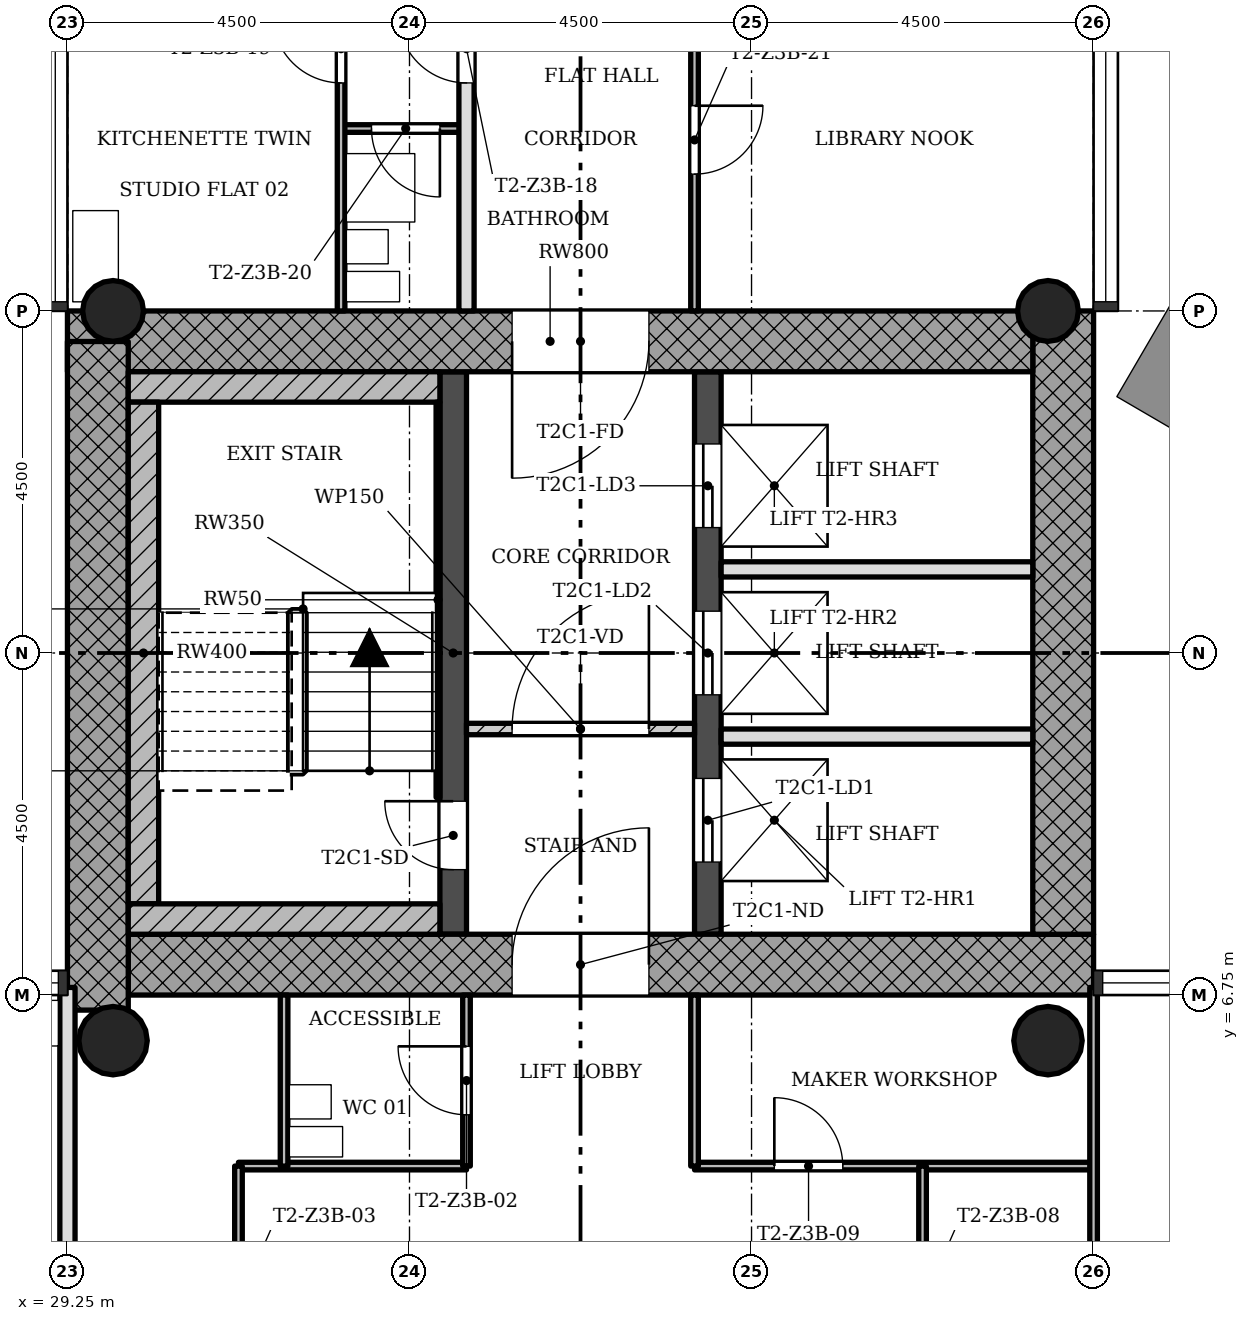
"""IFC4 building model, lengths in metres.
Left out: names, types, materials, properties, quantities, classifications, styles, units other than length and angle.
Written with IfcOpenShell. Run it as: python <this file> out.ifc"""

import sys

from ifc_helpers import new_model, si_unit, direction, frame, frame_2d, origin, origin_2d, place, context, subcontext, project, spatial, rectangle, hollow_circle, extrude, element, fill, save


model = new_model("IFC4")
c1 = context("Model", 3, precision=1e-05, world=origin(), true_north=direction((0.0, 1.0)))
c2 = subcontext(c1, "Body", "Model", "MODEL_VIEW")
j1 = project(units=[si_unit("LENGTHUNIT", "METRE"), si_unit("PLANEANGLEUNIT", "RADIAN")], contexts=[c1])
p1 = place(None, origin())
s1 = spatial("IfcSite", under=j1, at=p1, CompositionType="ELEMENT")
p2 = place(p1, origin())
s2 = spatial("IfcBuilding", under=s1, at=p2, CompositionType="ELEMENT")
p3 = place(p2, frame((0.0, 0.0, 143.9)))
s3 = spatial("IfcBuildingStorey", under=s2, at=p3, CompositionType="ELEMENT", Elevation=143.9)
p4 = place(p3, frame((30.05, 7.15, 0.0), z_axis=(0.0, 0.0, 1.0), x_axis=(1.0, 0.0, 0.0)))
e1 = element("IfcWall", 1, at=p4, inside=s3, PredefinedType="SHEAR", context=c2, shape_type="SweptSolid", body=[
    extrude(rectangle(XDim=12.7, YDim=0.8, at=frame_2d((6.35, 0.0))), origin(), (0.0, 0.0, 1.0), 3.4),
])
p5 = place(p4, frame((5.05, 0.0, 0.0)))
e2 = element("IfcOpeningElement", 2, at=p5, cuts=e1, PredefinedType="OPENING", context=c2, shape_type="SweptSolid", body=[
    extrude(rectangle(XDim=1.8, YDim=2.1, at=frame_2d((0.9, 1.05))), frame((0.0, 0.41, 0.0), z_axis=(0.0, -1.0, 0.0), x_axis=(1.0, 0.0, 0.0)), (0.0, 0.0, 1.0), 0.82),
])
p6 = place(p3, frame((42.35, 7.55, 0.0), z_axis=(0.0, 0.0, 1.0), x_axis=(0.0, 1.0, 0.0)))
e3 = element("IfcWall", 3, at=p6, inside=s3, PredefinedType="SHEAR", context=c2, shape_type="SweptSolid", body=[
    extrude(rectangle(XDim=8.2, YDim=0.8, at=frame_2d((4.1, 0.0))), origin(), (0.0, 0.0, 1.0), 3.4),
])
p7 = place(p3, frame((41.95, 15.35, 0.0), z_axis=(0.0, 0.0, 1.0), x_axis=(-1.0, 0.0, 0.0)))
e4 = element("IfcWall", 4, at=p7, inside=s3, PredefinedType="SHEAR", context=c2, shape_type="SweptSolid", body=[
    extrude(rectangle(XDim=12.7, YDim=0.8, at=frame_2d((6.35, 0.0))), origin(), (0.0, 0.0, 1.0), 3.4),
])
p8 = place(p7, frame((5.05, 0.0, 0.0)))
e5 = element("IfcOpeningElement", 5, at=p8, cuts=e4, PredefinedType="OPENING", context=c2, shape_type="SweptSolid", body=[
    extrude(rectangle(XDim=1.8, YDim=2.1, at=frame_2d((0.9, 1.05))), frame((0.0, 0.41, 0.0), z_axis=(0.0, -1.0, 0.0), x_axis=(1.0, 0.0, 0.0)), (0.0, 0.0, 1.0), 0.82),
])
p9 = place(p3, frame((29.65, 15.348, 0.0), z_axis=(0.0, 0.0, 1.0), x_axis=(0.0, -1.0, 0.0)))
e6 = element("IfcWall", 6, at=p9, inside=s3, PredefinedType="SHEAR", context=c2, shape_type="SweptSolid", body=[
    extrude(rectangle(XDim=8.796, YDim=0.8, at=frame_2d((4.398, 0.0))), origin(), (0.0, 0.0, 1.0), 3.4),
])
p10 = place(p3, frame((34.325, 7.55, 0.0), z_axis=(0.0, 0.0, 1.0), x_axis=(0.0, 1.0, 0.0)))
e7 = element("IfcWall", 7, at=p10, inside=s3, PredefinedType="SHEAR", context=c2, shape_type="SweptSolid", body=[
    extrude(rectangle(XDim=7.4, YDim=0.35, at=frame_2d((3.7, 0.0))), origin(), (0.0, 0.0, 1.0), 3.4),
])
p11 = place(p10, frame((0.85, 0.0, 0.0)))
e8 = element("IfcOpeningElement", 8, at=p11, cuts=e7, PredefinedType="OPENING", context=c2, shape_type="SweptSolid", body=[
    extrude(rectangle(XDim=0.9, YDim=2.1, at=frame_2d((0.45, 1.05))), frame((0.0, 0.185, 0.0), z_axis=(0.0, -1.0, 0.0), x_axis=(1.0, 0.0, 0.0)), (0.0, 0.0, 1.0), 0.37),
])
p12 = place(p3, frame((37.675, 7.55, 0.0), z_axis=(0.0, 0.0, 1.0), x_axis=(0.0, 1.0, 0.0)))
e9 = element("IfcWall", 9, at=p12, inside=s3, PredefinedType="SHEAR", context=c2, shape_type="SweptSolid", body=[
    extrude(rectangle(XDim=7.4, YDim=0.35, at=frame_2d((3.7, 0.0))), origin(), (0.0, 0.0, 1.0), 3.4),
])
p13 = place(p12, frame((0.95, 0.0, 0.0)))
e10 = element("IfcOpeningElement", 10, at=p13, cuts=e9, PredefinedType="OPENING", context=c2, shape_type="SweptSolid", body=[
    extrude(rectangle(XDim=1.1, YDim=2.1, at=frame_2d((0.55, 1.05))), frame((0.0, 0.185, 0.0), z_axis=(0.0, -1.0, 0.0), x_axis=(1.0, 0.0, 0.0)), (0.0, 0.0, 1.0), 0.37),
])
p14 = place(p12, frame((3.15, 0.0, 0.0)))
e11 = element("IfcOpeningElement", 11, at=p14, cuts=e9, PredefinedType="OPENING", context=c2, shape_type="SweptSolid", body=[
    extrude(rectangle(XDim=1.1, YDim=2.1, at=frame_2d((0.55, 1.05))), frame((0.0, 0.185, 0.0), z_axis=(0.0, -1.0, 0.0), x_axis=(1.0, 0.0, 0.0)), (0.0, 0.0, 1.0), 0.37),
])
p15 = place(p12, frame((5.35, 0.0, 0.0)))
e12 = element("IfcOpeningElement", 12, at=p15, cuts=e9, PredefinedType="OPENING", context=c2, shape_type="SweptSolid", body=[
    extrude(rectangle(XDim=1.1, YDim=2.1, at=frame_2d((0.55, 1.05))), frame((0.0, 0.185, 0.0), z_axis=(0.0, -1.0, 0.0), x_axis=(1.0, 0.0, 0.0)), (0.0, 0.0, 1.0), 0.37),
])
for number, where, z_axis, x_axis in (
    (13, (42.15, 15.75, 0.0), (0.0, 0.0, 1.0), (1.0, 0.0, 0.0)),
    (14, (29.85, 15.75, 0.0), (0.0, 0.0, 1.0), (1.0, 0.0, 0.0)),
):
    element("IfcColumn", number, at=place(p3, frame(where, z_axis=z_axis, x_axis=x_axis)), inside=s3, PredefinedType="COLUMN", context=c2, shape_type="SweptSolid", body=[
        extrude(hollow_circle(Radius=0.4, WallThickness=0.028, at=origin_2d()), origin(), (0.0, 0.0, 1.0), 3.4),
    ])
for number, where, z_axis, x_axis in (
    (15, (42.15, 6.15, 0.0), (0.0, 0.0, 1.0), (1.0, 0.0, 0.0)),
    (16, (29.85, 6.15, 0.0), (0.0, 0.0, 1.0), (1.0, 0.0, 0.0)),
):
    element("IfcColumn", number, at=place(p3, frame(where, z_axis=z_axis, x_axis=x_axis)), inside=s3, PredefinedType="COLUMN", context=c2, shape_type="SweptSolid", body=[
        extrude(hollow_circle(Radius=0.45, WallThickness=0.032, at=origin_2d()), origin(), (0.0, 0.0, 1.0), 3.4),
    ])
p16 = place(p3, frame((37.5, 10.25, 0.0), z_axis=(0.0, 0.0, 1.0), x_axis=(-1.0, 0.0, 0.0)))
e17 = element("IfcWall", 17, at=p16, inside=s3, PredefinedType="PARTITIONING", context=c2, shape_type="SweptSolid", body=[
    extrude(rectangle(XDim=3.0, YDim=0.15, at=frame_2d((1.5, 0.0))), origin(), (0.0, 0.0, 1.0), 3.0),
])
p17 = place(p16, frame((0.6, 0.0, 0.0)))
e18 = element("IfcOpeningElement", 18, at=p17, cuts=e17, PredefinedType="OPENING", context=c2, shape_type="SweptSolid", body=[
    extrude(rectangle(XDim=1.8, YDim=2.1, at=frame_2d((0.9, 1.05))), frame((0.0, 0.085, 0.0), z_axis=(0.0, -1.0, 0.0), x_axis=(1.0, 0.0, 0.0)), (0.0, 0.0, 1.0), 0.17),
])
for number, where, z_axis, x_axis in (
    (19, (41.95, 10.15, 0.0), (0.0, 0.0, 1.0), (-1.0, 0.0, 0.0)),
    (20, (41.95, 12.35, 0.0), (0.0, 0.0, 1.0), (-1.0, 0.0, 0.0)),
):
    element("IfcWall", number, at=place(p3, frame(where, z_axis=z_axis, x_axis=x_axis)), inside=s3, PredefinedType="SOLIDWALL", context=c2, shape_type="SweptSolid", body=[
        extrude(rectangle(XDim=4.1, YDim=0.2, at=frame_2d((2.05, 0.0))), origin(), (0.0, 0.0, 1.0), 3.0),
    ])
p18 = place(p3, frame((42.75, 4.5, 0.0), z_axis=(0.0, 0.0, 1.0), x_axis=(-1.0, 0.0, 0.0)))
e21 = element("IfcWall", 21, at=p18, inside=s3, PredefinedType="PARTITIONING", context=c2, shape_type="SweptSolid", body=[
    extrude(rectangle(XDim=5.25, YDim=0.1, at=frame_2d((2.625, 0.0))), origin(), (0.0, 0.0, 1.0), 3.0),
])
p19 = place(p18, frame((3.3, 0.0, 0.0)))
e22 = element("IfcOpeningElement", 22, at=p19, cuts=e21, PredefinedType="OPENING", context=c2, shape_type="SweptSolid", body=[
    extrude(rectangle(XDim=0.9, YDim=2.1, at=frame_2d((0.45, 1.05))), frame((0.0, 0.06, 0.0), z_axis=(0.0, -1.0, 0.0), x_axis=(1.0, 0.0, 0.0)), (0.0, 0.0, 1.0), 0.12),
])
p20 = place(p3, frame((34.5, 4.5, 0.0), z_axis=(0.0, 0.0, 1.0), x_axis=(-1.0, 0.0, 0.0)))
e23 = element("IfcWall", 23, at=p20, inside=s3, PredefinedType="PARTITIONING", context=c2, shape_type="SweptSolid", body=[
    extrude(rectangle(XDim=3.0, YDim=0.1, at=frame_2d((1.5, 0.0))), origin(), (0.0, 0.0, 1.0), 3.0),
])
p21 = place(p3, frame((34.5, 18.15, 0.0), z_axis=(0.0, 0.0, 1.0), x_axis=(-1.0, 0.0, 0.0)))
e24 = element("IfcWall", 24, at=p21, inside=s3, PredefinedType="PARTITIONING", context=c2, shape_type="SweptSolid", body=[
    extrude(rectangle(XDim=1.65, YDim=0.1, at=frame_2d((0.825, 0.0))), origin(), (0.0, 0.0, 1.0), 3.0),
])
p22 = place(p21, frame((0.35, 0.0, 0.0)))
e25 = element("IfcOpeningElement", 25, at=p22, cuts=e24, PredefinedType="OPENING", context=c2, shape_type="SweptSolid", body=[
    extrude(rectangle(XDim=0.9, YDim=2.1, at=frame_2d((0.45, 1.05))), frame((0.0, 0.06, 0.0), z_axis=(0.0, -1.0, 0.0), x_axis=(1.0, 0.0, 0.0)), (0.0, 0.0, 1.0), 0.12),
])
p23 = place(p3, frame((42.75, 0.9, 0.0), z_axis=(0.0, 0.0, 1.0), x_axis=(0.0, 1.0, 0.0)))
e26 = element("IfcWall", 26, at=p23, inside=s3, PredefinedType="PARTITIONING", context=c2, shape_type="SweptSolid", body=[
    extrude(rectangle(XDim=5.95, YDim=0.1, at=frame_2d((2.975, 0.0))), origin(), (0.0, 0.0, 1.0), 3.0),
])
p24 = place(p3, frame((40.5, 0.9, 0.0), z_axis=(0.0, 0.0, 1.0), x_axis=(0.0, 1.0, 0.0)))
e27 = element("IfcWall", 27, at=p24, inside=s3, PredefinedType="PARTITIONING", context=c2, shape_type="SweptSolid", body=[
    extrude(rectangle(XDim=3.6, YDim=0.1, at=frame_2d((1.8, 0.0))), origin(), (0.0, 0.0, 1.0), 3.0),
])
p25 = place(p24, frame((1.35, 0.0, 0.0)))
e28 = element("IfcOpeningElement", 28, at=p25, cuts=e27, PredefinedType="OPENING", context=c2, shape_type="SweptSolid", body=[
    extrude(rectangle(XDim=0.9, YDim=2.1, at=frame_2d((0.45, 1.05))), frame((0.0, 0.06, 0.0), z_axis=(0.0, -1.0, 0.0), x_axis=(1.0, 0.0, 0.0)), (0.0, 0.0, 1.0), 0.12),
])
p26 = place(p3, frame((37.5, 4.5, 0.0), z_axis=(0.0, 0.0, 1.0), x_axis=(0.0, 1.0, 0.0)))
e29 = element("IfcWall", 29, at=p26, inside=s3, PredefinedType="PARTITIONING", context=c2, shape_type="SweptSolid", body=[
    extrude(rectangle(XDim=2.25, YDim=0.1, at=frame_2d((1.125, 0.0))), origin(), (0.0, 0.0, 1.0), 3.0),
])
p27 = place(p3, frame((37.5, 15.75, 0.0), z_axis=(0.0, 0.0, 1.0), x_axis=(0.0, 1.0, 0.0)))
e30 = element("IfcWall", 30, at=p27, inside=s3, PredefinedType="PARTITIONING", context=c2, shape_type="SweptSolid", body=[
    extrude(rectangle(XDim=4.5, YDim=0.1, at=frame_2d((2.25, 0.0))), origin(), (0.0, 0.0, 1.0), 3.0),
])
p28 = place(p27, frame((1.8, 0.0, 0.0)))
e31 = element("IfcOpeningElement", 31, at=p28, cuts=e30, PredefinedType="OPENING", context=c2, shape_type="SweptSolid", body=[
    extrude(rectangle(XDim=0.9, YDim=2.1, at=frame_2d((0.45, 1.05))), frame((0.0, 0.06, 0.0), z_axis=(0.0, -1.0, 0.0), x_axis=(1.0, 0.0, 0.0)), (0.0, 0.0, 1.0), 0.12),
])
p29 = place(p3, frame((34.5, 4.5, 0.0), z_axis=(0.0, 0.0, 1.0), x_axis=(0.0, 1.0, 0.0)))
e32 = element("IfcWall", 32, at=p29, inside=s3, PredefinedType="PARTITIONING", context=c2, shape_type="SweptSolid", body=[
    extrude(rectangle(XDim=2.25, YDim=0.1, at=frame_2d((1.125, 0.0))), origin(), (0.0, 0.0, 1.0), 3.0),
])
p30 = place(p29, frame((0.675, 0.0, 0.0)))
e33 = element("IfcOpeningElement", 33, at=p30, cuts=e32, PredefinedType="OPENING", context=c2, shape_type="SweptSolid", body=[
    extrude(rectangle(XDim=0.9, YDim=2.1, at=frame_2d((0.45, 1.05))), frame((0.0, 0.06, 0.0), z_axis=(0.0, -1.0, 0.0), x_axis=(1.0, 0.0, 0.0)), (0.0, 0.0, 1.0), 0.12),
])
p31 = place(p3, frame((34.5, 15.75, 0.0), z_axis=(0.0, 0.0, 1.0), x_axis=(0.0, 1.0, 0.0)))
e34 = element("IfcWall", 34, at=p31, inside=s3, PredefinedType="SOLIDWALL", context=c2, shape_type="SweptSolid", body=[
    extrude(rectangle(XDim=4.5, YDim=0.2, at=frame_2d((2.25, 0.0))), origin(), (0.0, 0.0, 1.0), 3.0),
])
p32 = place(p31, frame((3.0, 0.0, 0.0)))
e35 = element("IfcOpeningElement", 35, at=p32, cuts=e34, PredefinedType="OPENING", context=c2, shape_type="SweptSolid", body=[
    extrude(rectangle(XDim=0.9, YDim=2.1, at=frame_2d((0.45, 1.05))), frame((0.0, 0.11, 0.0), z_axis=(0.0, -1.0, 0.0), x_axis=(1.0, 0.0, 0.0)), (0.0, 0.0, 1.0), 0.22),
])
p33 = place(p3, frame((32.85, 15.75, 0.0), z_axis=(0.0, 0.0, 1.0), x_axis=(0.0, 1.0, 0.0)))
e36 = element("IfcWall", 36, at=p33, inside=s3, PredefinedType="PARTITIONING", context=c2, shape_type="SweptSolid", body=[
    extrude(rectangle(XDim=4.5, YDim=0.1, at=frame_2d((2.25, 0.0))), origin(), (0.0, 0.0, 1.0), 3.0),
])
p34 = place(p33, frame((3.0, 0.0, 0.0)))
e37 = element("IfcOpeningElement", 37, at=p34, cuts=e36, PredefinedType="OPENING", context=c2, shape_type="SweptSolid", body=[
    extrude(rectangle(XDim=0.9, YDim=2.1, at=frame_2d((0.45, 1.05))), frame((0.0, 0.06, 0.0), z_axis=(0.0, -1.0, 0.0), x_axis=(1.0, 0.0, 0.0)), (0.0, 0.0, 1.0), 0.12),
])
p35 = place(p3, frame((32.1, 4.5, 0.0), z_axis=(0.0, 0.0, 1.0), x_axis=(0.0, 1.0, 0.0)))
e38 = element("IfcWall", 38, at=p35, inside=s3, PredefinedType="PARTITIONING", context=c2, shape_type="SweptSolid", body=[
    extrude(rectangle(XDim=2.25, YDim=0.1, at=frame_2d((1.125, 0.0))), origin(), (0.0, 0.0, 1.0), 3.0),
])
p36 = place(p3, frame((31.5, 0.9, 0.0), z_axis=(0.0, 0.0, 1.0), x_axis=(0.0, 1.0, 0.0)))
e39 = element("IfcWall", 39, at=p36, inside=s3, PredefinedType="PARTITIONING", context=c2, shape_type="SweptSolid", body=[
    extrude(rectangle(XDim=3.6, YDim=0.1, at=frame_2d((1.8, 0.0))), origin(), (0.0, 0.0, 1.0), 3.0),
])
p37 = place(p36, frame((1.35, 0.0, 0.0)))
e40 = element("IfcOpeningElement", 40, at=p37, cuts=e39, PredefinedType="OPENING", context=c2, shape_type="SweptSolid", body=[
    extrude(rectangle(XDim=0.9, YDim=2.1, at=frame_2d((0.45, 1.05))), frame((0.0, 0.06, 0.0), z_axis=(0.0, -1.0, 0.0), x_axis=(1.0, 0.0, 0.0)), (0.0, 0.0, 1.0), 0.12),
])
p38 = place(p3, frame((29.25, 0.9, 0.0), z_axis=(0.0, 0.0, 1.0), x_axis=(0.0, 1.0, 0.0)))
e41 = element("IfcWall", 41, at=p38, inside=s3, PredefinedType="SOLIDWALL", context=c2, shape_type="SweptSolid", body=[
    extrude(rectangle(XDim=5.95, YDim=0.2, at=frame_2d((2.975, 0.0))), origin(), (0.0, 0.0, 1.0), 3.0),
])
p39 = place(p3, frame((34.15, 14.75, 0.0), z_axis=(0.0, 0.0, 1.0), x_axis=(-1.0, 0.0, 0.0)))
e42 = element("IfcWall", 42, at=p39, inside=s3, PredefinedType="SHEAR", context=c2, shape_type="SweptSolid", body=[
    extrude(rectangle(XDim=4.1, YDim=0.4, at=frame_2d((2.05, 0.0))), origin(), (0.0, 0.0, 1.0), 3.4),
])
p40 = place(p3, frame((30.25, 7.95, 0.0), z_axis=(0.0, 0.0, 1.0), x_axis=(0.0, 1.0, 0.0)))
e43 = element("IfcWall", 43, at=p40, inside=s3, PredefinedType="SHEAR", context=c2, shape_type="SweptSolid", body=[
    extrude(rectangle(XDim=6.6, YDim=0.4, at=frame_2d((3.3, 0.0))), origin(), (0.0, 0.0, 1.0), 3.4),
])
p41 = place(p3, frame((34.15, 7.75, 0.0), z_axis=(0.0, 0.0, 1.0), x_axis=(-1.0, 0.0, 0.0)))
e44 = element("IfcWall", 44, at=p41, inside=s3, PredefinedType="SHEAR", context=c2, shape_type="SweptSolid", body=[
    extrude(rectangle(XDim=4.1, YDim=0.4, at=frame_2d((2.05, 0.0))), origin(), (0.0, 0.0, 1.0), 3.4),
])
p42 = place(p3, frame((34.125, 9.35, 0.0), z_axis=(0.0, 0.0, 1.0), x_axis=(0.0, 1.0, 0.0)))
e45 = element("IfcWall", 45, at=p42, inside=s3, PredefinedType="SHEAR", context=c2, shape_type="SweptSolid", body=[
    extrude(rectangle(XDim=5.2, YDim=0.05, at=frame_2d((2.6, 0.0))), origin(), (0.0, 0.0, 1.0), 3.4),
])
p43 = place(p17, origin())
e46 = element("IfcDoor", 46, at=p43, inside=s3, OperationType="SINGLE_SWING_LEFT", PredefinedType="DOOR", context=c2, shape_type="SweptSolid", body=[
    extrude(rectangle(XDim=1.8, YDim=2.1, at=frame_2d((0.9, 1.05))), frame((0.0, 0.025, 0.0), z_axis=(0.0, -1.0, 0.0), x_axis=(1.0, 0.0, 0.0)), (0.0, 0.0, 1.0), 0.05),
])
fill(e18, e46)
p44 = place(p30, origin())
e47 = element("IfcDoor", 47, at=p44, inside=s3, OperationType="SINGLE_SWING_LEFT", PredefinedType="DOOR", context=c2, shape_type="SweptSolid", body=[
    extrude(rectangle(XDim=0.9, YDim=2.1, at=frame_2d((0.45, 1.05))), frame((0.0, 0.025, 0.0), z_axis=(0.0, -1.0, 0.0), x_axis=(1.0, 0.0, 0.0)), (0.0, 0.0, 1.0), 0.05),
])
fill(e33, e47)
p45 = place(p19, origin())
e48 = element("IfcDoor", 48, at=p45, inside=s3, OperationType="SINGLE_SWING_RIGHT", PredefinedType="DOOR", context=c2, shape_type="SweptSolid", body=[
    extrude(rectangle(XDim=0.9, YDim=2.1, at=frame_2d((0.45, 1.05))), frame((0.0, 0.025, 0.0), z_axis=(0.0, -1.0, 0.0), x_axis=(1.0, 0.0, 0.0)), (0.0, 0.0, 1.0), 0.05),
])
fill(e22, e48)
p46 = place(p32, origin())
e49 = element("IfcDoor", 49, at=p46, inside=s3, OperationType="SINGLE_SWING_LEFT", PredefinedType="DOOR", context=c2, shape_type="SweptSolid", body=[
    extrude(rectangle(XDim=0.9, YDim=2.1, at=frame_2d((0.45, 1.05))), frame((0.0, 0.025, 0.0), z_axis=(0.0, -1.0, 0.0), x_axis=(1.0, 0.0, 0.0)), (0.0, 0.0, 1.0), 0.05),
])
fill(e35, e49)
p47 = place(p34, origin())
e50 = element("IfcDoor", 50, at=p47, inside=s3, OperationType="SINGLE_SWING_LEFT", PredefinedType="DOOR", context=c2, shape_type="SweptSolid", body=[
    extrude(rectangle(XDim=0.9, YDim=2.1, at=frame_2d((0.45, 1.05))), frame((0.0, 0.025, 0.0), z_axis=(0.0, -1.0, 0.0), x_axis=(1.0, 0.0, 0.0)), (0.0, 0.0, 1.0), 0.05),
])
fill(e37, e50)
p48 = place(p22, origin())
e51 = element("IfcDoor", 51, at=p48, inside=s3, OperationType="SINGLE_SWING_RIGHT", PredefinedType="DOOR", context=c2, shape_type="SweptSolid", body=[
    extrude(rectangle(XDim=0.9, YDim=2.1, at=frame_2d((0.45, 1.05))), frame((0.0, 0.025, 0.0), z_axis=(0.0, -1.0, 0.0), x_axis=(1.0, 0.0, 0.0)), (0.0, 0.0, 1.0), 0.05),
])
fill(e25, e51)
p49 = place(p28, origin())
e52 = element("IfcDoor", 52, at=p49, inside=s3, OperationType="SINGLE_SWING_RIGHT", PredefinedType="DOOR", context=c2, shape_type="SweptSolid", body=[
    extrude(rectangle(XDim=0.9, YDim=2.1, at=frame_2d((0.45, 1.05))), frame((0.0, 0.025, 0.0), z_axis=(0.0, -1.0, 0.0), x_axis=(1.0, 0.0, 0.0)), (0.0, 0.0, 1.0), 0.05),
])
fill(e31, e52)
p50 = place(p11, origin())
e53 = element("IfcDoor", 53, at=p50, inside=s3, OperationType="SINGLE_SWING_LEFT", PredefinedType="DOOR", context=c2, shape_type="SweptSolid", body=[
    extrude(rectangle(XDim=0.9, YDim=2.1, at=frame_2d((0.45, 1.05))), frame((0.0, 0.025, 0.0), z_axis=(0.0, -1.0, 0.0), x_axis=(1.0, 0.0, 0.0)), (0.0, 0.0, 1.0), 0.05),
])
fill(e8, e53)
p51 = place(p13, origin())
e54 = element("IfcDoor", 54, at=p51, inside=s3, OperationType="SLIDING_TO_LEFT", PredefinedType="DOOR", context=c2, shape_type="SweptSolid", body=[
    extrude(rectangle(XDim=1.1, YDim=2.1, at=frame_2d((0.55, 1.05))), frame((0.0, 0.025, 0.0), z_axis=(0.0, -1.0, 0.0), x_axis=(1.0, 0.0, 0.0)), (0.0, 0.0, 1.0), 0.05),
])
fill(e10, e54)
p52 = place(p14, origin())
e55 = element("IfcDoor", 55, at=p52, inside=s3, OperationType="SLIDING_TO_LEFT", PredefinedType="DOOR", context=c2, shape_type="SweptSolid", body=[
    extrude(rectangle(XDim=1.1, YDim=2.1, at=frame_2d((0.55, 1.05))), frame((0.0, 0.025, 0.0), z_axis=(0.0, -1.0, 0.0), x_axis=(1.0, 0.0, 0.0)), (0.0, 0.0, 1.0), 0.05),
])
fill(e11, e55)
p53 = place(p15, origin())
e56 = element("IfcDoor", 56, at=p53, inside=s3, OperationType="SLIDING_TO_LEFT", PredefinedType="DOOR", context=c2, shape_type="SweptSolid", body=[
    extrude(rectangle(XDim=1.1, YDim=2.1, at=frame_2d((0.55, 1.05))), frame((0.0, 0.025, 0.0), z_axis=(0.0, -1.0, 0.0), x_axis=(1.0, 0.0, 0.0)), (0.0, 0.0, 1.0), 0.05),
])
fill(e12, e56)
p54 = place(p5, origin())
e57 = element("IfcDoor", 57, at=p54, inside=s3, OperationType="SINGLE_SWING_LEFT", PredefinedType="DOOR", context=c2, shape_type="SweptSolid", body=[
    extrude(rectangle(XDim=1.8, YDim=2.1, at=frame_2d((0.9, 1.05))), frame((0.0, 0.025, 0.0), z_axis=(0.0, -1.0, 0.0), x_axis=(1.0, 0.0, 0.0)), (0.0, 0.0, 1.0), 0.05),
])
fill(e2, e57)
p55 = place(p8, origin())
e58 = element("IfcDoor", 58, at=p55, inside=s3, OperationType="SINGLE_SWING_LEFT", PredefinedType="DOOR", context=c2, shape_type="SweptSolid", body=[
    extrude(rectangle(XDim=1.8, YDim=2.1, at=frame_2d((0.9, 1.05))), frame((0.0, 0.025, 0.0), z_axis=(0.0, -1.0, 0.0), x_axis=(1.0, 0.0, 0.0)), (0.0, 0.0, 1.0), 0.05),
])
fill(e5, e58)
save(model, sys.argv[1])
